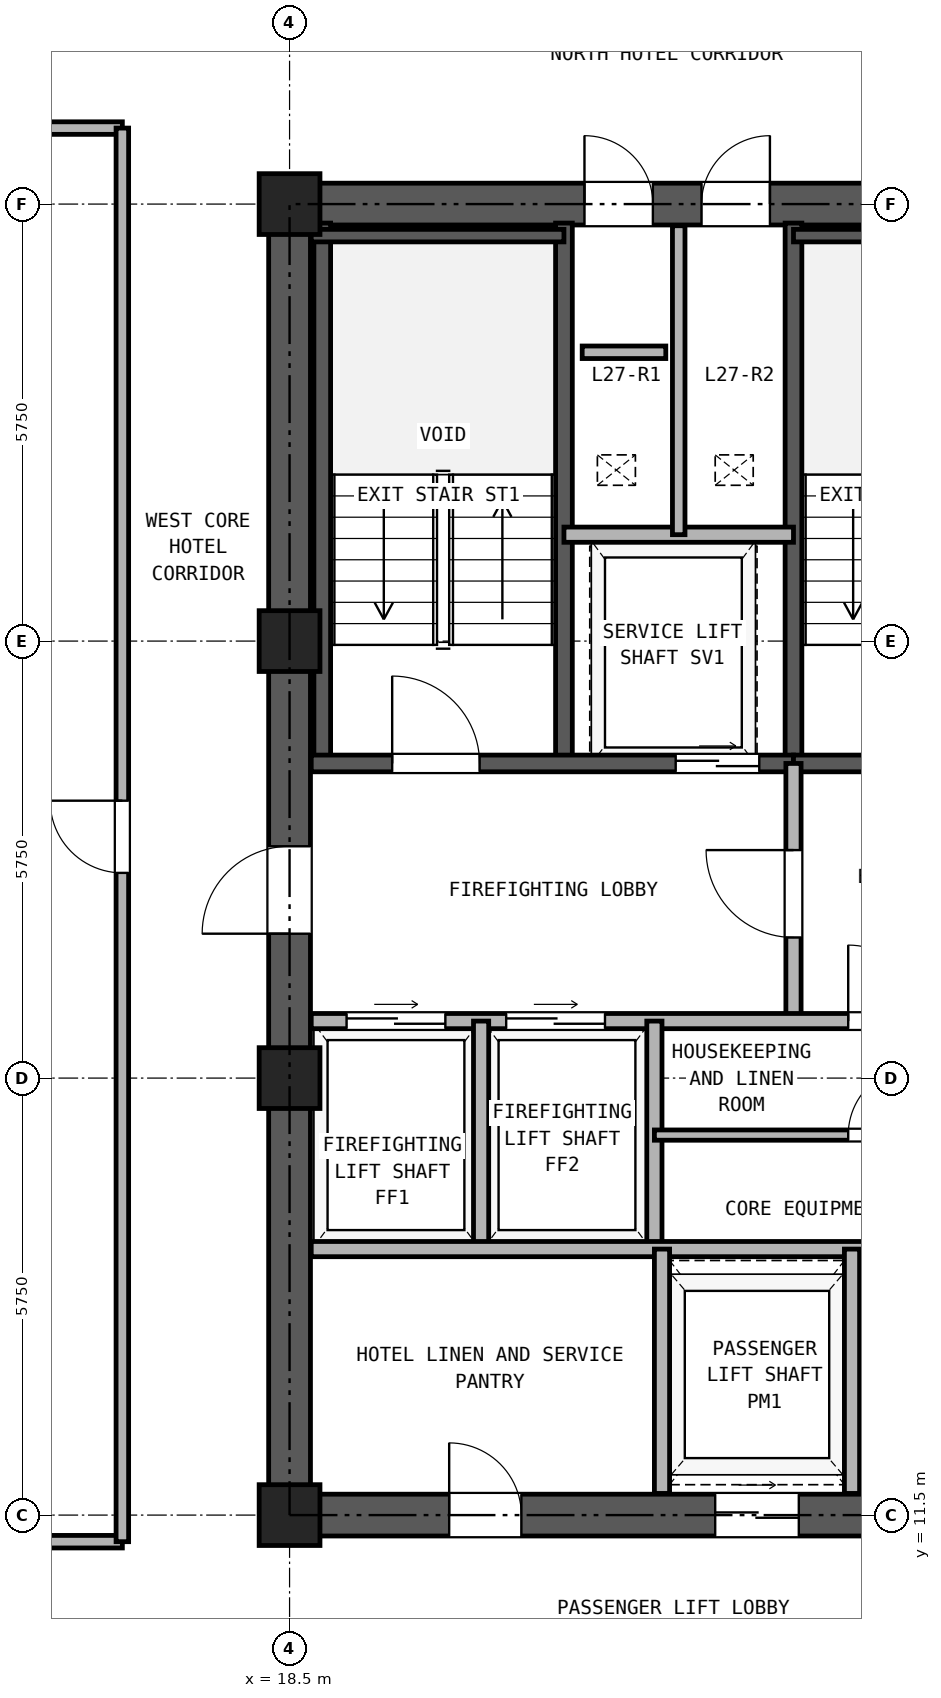
"""IFC4 building model, lengths in metres.
Left out: names, types, materials, properties, quantities, classifications, styles, units other than length and angle.
Written with IfcOpenShell. Run it as: python <this file> out.ifc"""

import sys

from ifc_helpers import new_model, si_unit, direction, frame, frame_2d, origin, origin_2d, place, context, subcontext, project, spatial, rectangle, hollow_rectangle, extrude, source, transform, mapped, element, fill, save


model = new_model("IFC4")
c1 = context("Model", 3, precision=1e-05, world=origin(), true_north=direction((0.0, 1.0)))
c2 = subcontext(c1, "Body", "Model", "MODEL_VIEW")
j1 = project(units=[si_unit("LENGTHUNIT", "METRE"), si_unit("PLANEANGLEUNIT", "RADIAN")], contexts=[c1])
p1 = place(None, origin())
s1 = spatial("IfcSite", under=j1, at=p1, CompositionType="ELEMENT")
p2 = place(p1, origin())
s2 = spatial("IfcBuilding", under=s1, at=p2, CompositionType="ELEMENT")
p3 = place(p2, frame((0.0, 0.0, 102.3)))
s3 = spatial("IfcBuildingStorey", under=s2, at=p3, CompositionType="ELEMENT", Elevation=102.3)
m1 = source(origin(), c2, "Body", "SweptSolid", [
    extrude(hollow_rectangle(XDim=0.8, YDim=0.8, WallThickness=0.045, at=origin_2d()), origin(), (0.0, 0.0, 1.0), 2.95),
])
for number, where, z_axis, x_axis in (
    (1, (18.5, 11.5, 0.0), (0.0, 0.0, 1.0), (1.0, 0.0, 0.0)),
    (2, (18.5, 17.25, 0.0), (0.0, 0.0, 1.0), (1.0, 0.0, 0.0)),
    (3, (18.5, 23.0, 0.0), (0.0, 0.0, 1.0), (1.0, 0.0, 0.0)),
    (4, (18.5, 28.75, 0.0), (0.0, 0.0, 1.0), (1.0, 0.0, 0.0)),
):
    element("IfcColumn", number, at=place(p3, frame(where, z_axis=z_axis, x_axis=x_axis)), inside=s3, PredefinedType="COLUMN", context=c2, shape_type="MappedRepresentation", body=[
        mapped(m1, transform((0.0, 0.0, 0.0), x_axis=(1.0, 0.0, 0.0), y_axis=(0.0, 1.0, 0.0), z_axis=(0.0, 0.0, 1.0), scale=1.0)),
    ])
p4 = place(p3, frame((18.225, 11.5, 0.0), z_axis=(0.0, 0.0, 1.0), x_axis=(1.0, 0.0, 0.0)))
e5 = element("IfcWall", 5, at=p4, inside=s3, PredefinedType="SHEAR", context=c2, shape_type="SweptSolid", body=[
    extrude(rectangle(XDim=10.55, YDim=0.55, at=frame_2d((5.275, 0.0))), origin(), (0.0, 0.0, 1.0), 2.95),
])
p5 = place(p4, frame((2.375, 0.0, 0.0)))
e6 = element("IfcOpeningElement", 6, at=p5, cuts=e5, PredefinedType="OPENING", context=c2, shape_type="SweptSolid", body=[
    extrude(rectangle(XDim=0.95, YDim=2.15, at=frame_2d((0.475, 1.075))), frame((0.0, 0.285, 0.0), z_axis=(0.0, -1.0, 0.0), x_axis=(1.0, 0.0, 0.0)), (0.0, 0.0, 1.0), 0.57),
])
p6 = place(p4, frame((5.875, 0.0, 0.0)))
e7 = element("IfcOpeningElement", 7, at=p6, cuts=e5, PredefinedType="OPENING", context=c2, shape_type="SweptSolid", body=[
    extrude(rectangle(XDim=1.1, YDim=2.25, at=frame_2d((0.55, 1.125))), frame((0.0, 0.285, 0.0), z_axis=(0.0, -1.0, 0.0), x_axis=(1.0, 0.0, 0.0)), (0.0, 0.0, 1.0), 0.57),
])
p7 = place(p4, frame((8.275, 0.0, 0.0)))
e8 = element("IfcOpeningElement", 8, at=p7, cuts=e5, PredefinedType="OPENING", context=c2, shape_type="SweptSolid", body=[
    extrude(rectangle(XDim=1.1, YDim=2.25, at=frame_2d((0.55, 1.125))), frame((0.0, 0.285, 0.0), z_axis=(0.0, -1.0, 0.0), x_axis=(1.0, 0.0, 0.0)), (0.0, 0.0, 1.0), 0.57),
])
p8 = place(p3, frame((18.225, 28.75, 0.0), z_axis=(0.0, 0.0, 1.0), x_axis=(1.0, 0.0, 0.0)))
e9 = element("IfcWall", 9, at=p8, inside=s3, PredefinedType="SHEAR", context=c2, shape_type="SweptSolid", body=[
    extrude(rectangle(XDim=10.55, YDim=0.55, at=frame_2d((5.275, 0.0))), origin(), (0.0, 0.0, 1.0), 2.95),
])
p9 = place(p8, frame((4.155, 0.0, 0.0)))
e10 = element("IfcOpeningElement", 10, at=p9, cuts=e9, PredefinedType="OPENING", context=c2, shape_type="SweptSolid", body=[
    extrude(rectangle(XDim=0.9, YDim=2.05, at=frame_2d((0.45, 1.025))), frame((0.0, 0.285, 0.0), z_axis=(0.0, -1.0, 0.0), x_axis=(1.0, 0.0, 0.0)), (0.0, 0.0, 1.0), 0.57),
])
p10 = place(p8, frame((5.695, 0.0, 0.0)))
e11 = element("IfcOpeningElement", 11, at=p10, cuts=e9, PredefinedType="OPENING", context=c2, shape_type="SweptSolid", body=[
    extrude(rectangle(XDim=0.9, YDim=2.05, at=frame_2d((0.45, 1.025))), frame((0.0, 0.285, 0.0), z_axis=(0.0, -1.0, 0.0), x_axis=(1.0, 0.0, 0.0)), (0.0, 0.0, 1.0), 0.57),
])
p11 = place(p3, frame((18.5, 11.775, 0.0), z_axis=(0.0, 0.0, 1.0), x_axis=(0.0, 1.0, 0.0)))
e12 = element("IfcWall", 12, at=p11, inside=s3, PredefinedType="SHEAR", context=c2, shape_type="SweptSolid", body=[
    extrude(rectangle(XDim=16.7, YDim=0.55, at=frame_2d((8.35, 0.0))), origin(), (0.0, 0.0, 1.0), 2.95),
])
p12 = place(p11, frame((7.375, 0.0, 0.0)))
e13 = element("IfcOpeningElement", 13, at=p12, cuts=e12, PredefinedType="OPENING", context=c2, shape_type="SweptSolid", body=[
    extrude(rectangle(XDim=1.15, YDim=2.2, at=frame_2d((0.575, 1.1))), frame((0.0, 0.285, 0.0), z_axis=(0.0, -1.0, 0.0), x_axis=(1.0, 0.0, 0.0)), (0.0, 0.0, 1.0), 0.57),
])
for number, where, z_axis, x_axis in (
    (14, (18.93, 21.39, 0.0), (0.0, 0.0, 1.0), (0.0, 1.0, 0.0)),
    (15, (22.11, 21.39, 0.0), (0.0, 0.0, 1.0), (0.0, 1.0, 0.0)),
    (16, (25.13, 21.39, 0.0), (0.0, 0.0, 1.0), (0.0, 1.0, 0.0)),
):
    element("IfcWall", number, at=place(p3, frame(where, z_axis=z_axis, x_axis=x_axis)), inside=s3, PredefinedType="SOLIDWALL", context=c2, shape_type="SweptSolid", body=[
        extrude(rectangle(XDim=7.11, YDim=0.22, at=frame_2d((3.555, 0.0))), origin(), (0.0, 0.0, 1.0), 2.95),
    ])
p13 = place(p3, frame((18.785, 28.335, 0.0), z_axis=(0.0, 0.0, 1.0), x_axis=(1.0, 0.0, 0.0)))
e17 = element("IfcWall", 17, at=p13, inside=s3, PredefinedType="PARTITIONING", context=c2, shape_type="SweptSolid", body=[
    extrude(rectangle(XDim=3.325, YDim=0.165, at=frame_2d((1.663, 0.0))), origin(), (0.0, 0.0, 1.0), 2.95),
])
p14 = place(p3, frame((25.13, 28.335, 0.0), z_axis=(0.0, 0.0, 1.0), x_axis=(1.0, 0.0, 0.0)))
e18 = element("IfcWall", 18, at=p14, inside=s3, PredefinedType="PARTITIONING", context=c2, shape_type="SweptSolid", body=[
    extrude(rectangle(XDim=3.085, YDim=0.165, at=frame_2d((1.542, 0.0))), origin(), (0.0, 0.0, 1.0), 2.95),
])
p15 = place(p3, frame((18.785, 21.39, 0.0), z_axis=(0.0, 0.0, 1.0), x_axis=(1.0, 0.0, 0.0)))
e19 = element("IfcWall", 19, at=p15, inside=s3, PredefinedType="SOLIDWALL", context=c2, shape_type="SweptSolid", body=[
    extrude(rectangle(XDim=6.345, YDim=0.22, at=frame_2d((3.172, 0.0))), origin(), (0.0, 0.0, 1.0), 2.95),
])
p16 = place(p15, frame((1.065, 0.0, 0.0)))
e20 = element("IfcOpeningElement", 20, at=p16, cuts=e19, PredefinedType="OPENING", context=c2, shape_type="SweptSolid", body=[
    extrude(rectangle(XDim=1.15, YDim=2.2, at=frame_2d((0.575, 1.1))), frame((0.0, 0.12, 0.0), z_axis=(0.0, -1.0, 0.0), x_axis=(1.0, 0.0, 0.0)), (0.0, 0.0, 1.0), 0.24),
])
p17 = place(p15, frame((4.795, 0.0, 0.0)))
e21 = element("IfcOpeningElement", 21, at=p17, cuts=e19, PredefinedType="OPENING", context=c2, shape_type="SweptSolid", body=[
    extrude(rectangle(XDim=1.1, YDim=2.25, at=frame_2d((0.55, 1.125))), frame((0.0, 0.12, 0.0), z_axis=(0.0, -1.0, 0.0), x_axis=(1.0, 0.0, 0.0)), (0.0, 0.0, 1.0), 0.24),
])
p18 = place(p3, frame((25.13, 21.39, 0.0), z_axis=(0.0, 0.0, 1.0), x_axis=(1.0, 0.0, 0.0)))
e22 = element("IfcWall", 22, at=p18, inside=s3, PredefinedType="SOLIDWALL", context=c2, shape_type="SweptSolid", body=[
    extrude(rectangle(XDim=3.085, YDim=0.22, at=frame_2d((1.542, 0.0))), origin(), (0.0, 0.0, 1.0), 2.95),
])
p19 = place(p18, frame((0.92, 0.0, 0.0)))
e23 = element("IfcOpeningElement", 23, at=p19, cuts=e22, PredefinedType="OPENING", context=c2, shape_type="SweptSolid", body=[
    extrude(rectangle(XDim=1.15, YDim=2.2, at=frame_2d((0.575, 1.1))), frame((0.0, 0.12, 0.0), z_axis=(0.0, -1.0, 0.0), x_axis=(1.0, 0.0, 0.0)), (0.0, 0.0, 1.0), 0.24),
])
p20 = place(p3, frame((22.11, 24.4, 0.0), z_axis=(0.0, 0.0, 1.0), x_axis=(1.0, 0.0, 0.0)))
e24 = element("IfcWall", 24, at=p20, inside=s3, PredefinedType="PARTITIONING", context=c2, shape_type="SweptSolid", body=[
    extrude(rectangle(XDim=3.02, YDim=0.2, at=frame_2d((1.51, 0.0))), origin(), (0.0, 0.0, 1.0), 2.95),
])
p21 = place(p3, frame((23.62, 24.4, 0.0), z_axis=(0.0, 0.0, 1.0), x_axis=(0.0, 1.0, 0.0)))
e25 = element("IfcWall", 25, at=p21, inside=s3, PredefinedType="PARTITIONING", context=c2, shape_type="SweptSolid", body=[
    extrude(rectangle(XDim=4.065, YDim=0.165, at=frame_2d((2.033, 0.0))), origin(), (0.0, 0.0, 1.0), 2.95),
])
p22 = place(p3, frame((25.13, 18.0, 0.0), z_axis=(0.0, 0.0, 1.0), x_axis=(0.0, 1.0, 0.0)))
e26 = element("IfcWall", 26, at=p22, inside=s3, PredefinedType="PARTITIONING", context=c2, shape_type="SweptSolid", body=[
    extrude(rectangle(XDim=3.39, YDim=0.2, at=frame_2d((1.695, 0.0))), origin(), (0.0, 0.0, 1.0), 2.95),
])
p23 = place(p22, frame((1.1, 0.0, 0.0)))
e27 = element("IfcOpeningElement", 27, at=p23, cuts=e26, PredefinedType="OPENING", context=c2, shape_type="SweptSolid", body=[
    extrude(rectangle(XDim=1.15, YDim=2.2, at=frame_2d((0.575, 1.1))), frame((0.0, 0.11, 0.0), z_axis=(0.0, -1.0, 0.0), x_axis=(1.0, 0.0, 0.0)), (0.0, 0.0, 1.0), 0.22),
])
p24 = place(p3, frame((18.785, 18.0, 0.0), z_axis=(0.0, 0.0, 1.0), x_axis=(1.0, 0.0, 0.0)))
e28 = element("IfcWall", 28, at=p24, inside=s3, PredefinedType="PARTITIONING", context=c2, shape_type="SweptSolid", body=[
    extrude(rectangle(XDim=9.43, YDim=0.2, at=frame_2d((4.715, 0.0))), origin(), (0.0, 0.0, 1.0), 2.95),
])
p25 = place(p24, frame((0.465, 0.0, 0.0)))
e29 = element("IfcOpeningElement", 29, at=p25, cuts=e28, PredefinedType="OPENING", context=c2, shape_type="SweptSolid", body=[
    extrude(rectangle(XDim=1.3, YDim=2.3, at=frame_2d((0.65, 1.15))), frame((0.0, 0.11, 0.0), z_axis=(0.0, -1.0, 0.0), x_axis=(1.0, 0.0, 0.0)), (0.0, 0.0, 1.0), 0.22),
])
p26 = place(p24, frame((2.565, 0.0, 0.0)))
e30 = element("IfcOpeningElement", 30, at=p26, cuts=e28, PredefinedType="OPENING", context=c2, shape_type="SweptSolid", body=[
    extrude(rectangle(XDim=1.3, YDim=2.3, at=frame_2d((0.65, 1.15))), frame((0.0, 0.11, 0.0), z_axis=(0.0, -1.0, 0.0), x_axis=(1.0, 0.0, 0.0)), (0.0, 0.0, 1.0), 0.22),
])
p27 = place(p24, frame((7.065, 0.0, 0.0)))
e31 = element("IfcOpeningElement", 31, at=p27, cuts=e28, PredefinedType="OPENING", context=c2, shape_type="SweptSolid", body=[
    extrude(rectangle(XDim=1.0, YDim=2.15, at=frame_2d((0.5, 1.075))), frame((0.0, 0.11, 0.0), z_axis=(0.0, -1.0, 0.0), x_axis=(1.0, 0.0, 0.0)), (0.0, 0.0, 1.0), 0.22),
])
for number, where, z_axis, x_axis in (
    (32, (21.02, 15.0, 0.0), (0.0, 0.0, 1.0), (0.0, 1.0, 0.0)),
    (33, (23.3, 15.0, 0.0), (0.0, 0.0, 1.0), (0.0, 1.0, 0.0)),
):
    element("IfcWall", number, at=place(p3, frame(where, z_axis=z_axis, x_axis=x_axis)), inside=s3, PredefinedType="PARTITIONING", context=c2, shape_type="SweptSolid", body=[
        extrude(rectangle(XDim=3.0, YDim=0.2, at=frame_2d((1.5, 0.0))), origin(), (0.0, 0.0, 1.0), 2.95),
    ])
p28 = place(p3, frame((18.785, 15.0, 0.0), z_axis=(0.0, 0.0, 1.0), x_axis=(1.0, 0.0, 0.0)))
e34 = element("IfcWall", 34, at=p28, inside=s3, PredefinedType="PARTITIONING", context=c2, shape_type="SweptSolid", body=[
    extrude(rectangle(XDim=9.43, YDim=0.2, at=frame_2d((4.715, 0.0))), origin(), (0.0, 0.0, 1.0), 2.95),
])
p29 = place(p3, frame((23.3, 16.5, 0.0), z_axis=(0.0, 0.0, 1.0), x_axis=(1.0, 0.0, 0.0)))
e35 = element("IfcWall", 35, at=p29, inside=s3, PredefinedType="PARTITIONING", context=c2, shape_type="SweptSolid", body=[
    extrude(rectangle(XDim=4.915, YDim=0.135, at=frame_2d((2.458, 0.0))), origin(), (0.0, 0.0, 1.0), 2.95),
])
p30 = place(p29, frame((2.55, 0.0, 0.0)))
e36 = element("IfcOpeningElement", 36, at=p30, cuts=e35, PredefinedType="OPENING", context=c2, shape_type="SweptSolid", body=[
    extrude(rectangle(XDim=0.9, YDim=2.05, at=frame_2d((0.45, 1.025))), frame((0.0, 0.077, 0.0), z_axis=(0.0, -1.0, 0.0), x_axis=(1.0, 0.0, 0.0)), (0.0, 0.0, 1.0), 0.155),
])
for number, where, z_axis, x_axis in (
    (37, (23.4, 11.785, 0.0), (0.0, 0.0, 1.0), (0.0, 1.0, 0.0)),
    (38, (25.9, 11.785, 0.0), (0.0, 0.0, 1.0), (0.0, 1.0, 0.0)),
):
    element("IfcWall", number, at=place(p3, frame(where, z_axis=z_axis, x_axis=x_axis)), inside=s3, PredefinedType="PARTITIONING", context=c2, shape_type="SweptSolid", body=[
        extrude(rectangle(XDim=3.215, YDim=0.2, at=frame_2d((1.607, 0.0))), origin(), (0.0, 0.0, 1.0), 2.95),
    ])
for number, where, z_axis, x_axis in (
    (39, (9.2, 11.15, 0.0), (0.0, 0.0, 1.0), (1.0, 0.0, 0.0)),
    (40, (9.2, 29.75, 0.0), (0.0, 0.0, 1.0), (1.0, 0.0, 0.0)),
):
    element("IfcWall", number, at=place(p3, frame(where, z_axis=z_axis, x_axis=x_axis)), inside=s3, PredefinedType="PARTITIONING", context=c2, shape_type="SweptSolid", body=[
        extrude(rectangle(XDim=7.1, YDim=0.165, at=frame_2d((3.55, 0.0))), origin(), (0.0, 0.0, 1.0), 2.95),
    ])
p31 = place(p3, frame((16.3, 11.15, 0.0), z_axis=(0.0, 0.0, 1.0), x_axis=(0.0, 1.0, 0.0)))
e41 = element("IfcWall", 41, at=p31, inside=s3, PredefinedType="PARTITIONING", context=c2, shape_type="SweptSolid", body=[
    extrude(rectangle(XDim=18.6, YDim=0.165, at=frame_2d((9.3, 0.0))), origin(), (0.0, 0.0, 1.0), 2.95),
])
p32 = place(p31, frame((8.8, 0.0, 0.0)))
e42 = element("IfcOpeningElement", 42, at=p32, cuts=e41, PredefinedType="OPENING", context=c2, shape_type="SweptSolid", body=[
    extrude(rectangle(XDim=0.95, YDim=2.15, at=frame_2d((0.475, 1.075))), frame((0.0, 0.093, 0.0), z_axis=(0.0, -1.0, 0.0), x_axis=(1.0, 0.0, 0.0)), (0.0, 0.0, 1.0), 0.185),
])
p33 = place(p3, frame((22.35, 26.8, 0.0), z_axis=(0.0, 0.0, 1.0), x_axis=(1.0, 0.0, 0.0)))
e43 = element("IfcWall", 43, at=p33, inside=s3, PredefinedType="PARTITIONING", context=c2, shape_type="SweptSolid", body=[
    extrude(rectangle(XDim=1.1, YDim=0.165, at=frame_2d((0.55, 0.0))), origin(), (0.0, 0.0, 1.0), 2.95),
])
p34 = place(p16, frame((1.15, 0.0, 0.0), z_axis=(0.0, 0.0, 1.0), x_axis=(-1.0, 0.0, 0.0)))
e44 = element("IfcDoor", 44, at=p34, inside=s3, OperationType="SINGLE_SWING_LEFT", PredefinedType="DOOR", context=c2, shape_type="SweptSolid", body=[
    extrude(rectangle(XDim=1.15, YDim=2.2, at=frame_2d((0.575, 1.1))), frame((0.0, 0.025, 0.0), z_axis=(0.0, -1.0, 0.0), x_axis=(1.0, 0.0, 0.0)), (0.0, 0.0, 1.0), 0.05),
])
fill(e20, e44)
p35 = place(p17, frame((1.1, 0.0, 0.0), z_axis=(0.0, 0.0, 1.0), x_axis=(-1.0, 0.0, 0.0)))
e45 = element("IfcDoor", 45, at=p35, inside=s3, OperationType="DOUBLE_DOOR_SLIDING", PredefinedType="DOOR", context=c2, shape_type="SweptSolid", body=[
    extrude(rectangle(XDim=1.1, YDim=2.25, at=frame_2d((0.55, 1.125))), frame((0.0, 0.025, 0.0), z_axis=(0.0, -1.0, 0.0), x_axis=(1.0, 0.0, 0.0)), (0.0, 0.0, 1.0), 0.05),
])
fill(e21, e45)
p36 = place(p23, origin())
e46 = element("IfcDoor", 46, at=p36, inside=s3, OperationType="SINGLE_SWING_RIGHT", PredefinedType="DOOR", context=c2, shape_type="SweptSolid", body=[
    extrude(rectangle(XDim=1.15, YDim=2.2, at=frame_2d((0.575, 1.1))), frame((0.0, 0.025, 0.0), z_axis=(0.0, -1.0, 0.0), x_axis=(1.0, 0.0, 0.0)), (0.0, 0.0, 1.0), 0.05),
])
fill(e27, e46)
p37 = place(p25, origin())
e47 = element("IfcDoor", 47, at=p37, inside=s3, OperationType="DOUBLE_DOOR_SLIDING", PredefinedType="DOOR", context=c2, shape_type="SweptSolid", body=[
    extrude(rectangle(XDim=1.3, YDim=2.3, at=frame_2d((0.65, 1.15))), frame((0.0, 0.025, 0.0), z_axis=(0.0, -1.0, 0.0), x_axis=(1.0, 0.0, 0.0)), (0.0, 0.0, 1.0), 0.05),
])
fill(e29, e47)
p38 = place(p26, origin())
e48 = element("IfcDoor", 48, at=p38, inside=s3, OperationType="DOUBLE_DOOR_SLIDING", PredefinedType="DOOR", context=c2, shape_type="SweptSolid", body=[
    extrude(rectangle(XDim=1.3, YDim=2.3, at=frame_2d((0.65, 1.15))), frame((0.0, 0.025, 0.0), z_axis=(0.0, -1.0, 0.0), x_axis=(1.0, 0.0, 0.0)), (0.0, 0.0, 1.0), 0.05),
])
fill(e30, e48)
p39 = place(p27, frame((1.0, 0.0, 0.0), z_axis=(0.0, 0.0, 1.0), x_axis=(-1.0, 0.0, 0.0)))
e49 = element("IfcDoor", 49, at=p39, inside=s3, OperationType="SINGLE_SWING_LEFT", PredefinedType="DOOR", context=c2, shape_type="SweptSolid", body=[
    extrude(rectangle(XDim=1.0, YDim=2.15, at=frame_2d((0.5, 1.075))), frame((0.0, 0.025, 0.0), z_axis=(0.0, -1.0, 0.0), x_axis=(1.0, 0.0, 0.0)), (0.0, 0.0, 1.0), 0.05),
])
fill(e31, e49)
p40 = place(p30, frame((0.9, 0.0, 0.0), z_axis=(0.0, 0.0, 1.0), x_axis=(-1.0, 0.0, 0.0)))
e50 = element("IfcDoor", 50, at=p40, inside=s3, OperationType="SINGLE_SWING_RIGHT", PredefinedType="DOOR", context=c2, shape_type="SweptSolid", body=[
    extrude(rectangle(XDim=0.9, YDim=2.05, at=frame_2d((0.45, 1.025))), frame((0.0, 0.025, 0.0), z_axis=(0.0, -1.0, 0.0), x_axis=(1.0, 0.0, 0.0)), (0.0, 0.0, 1.0), 0.05),
])
fill(e36, e50)
p41 = place(p12, frame((1.15, 0.0, 0.0), z_axis=(0.0, 0.0, 1.0), x_axis=(-1.0, 0.0, 0.0)))
e51 = element("IfcDoor", 51, at=p41, inside=s3, OperationType="SINGLE_SWING_LEFT", PredefinedType="DOOR", context=c2, shape_type="SweptSolid", body=[
    extrude(rectangle(XDim=1.15, YDim=2.2, at=frame_2d((0.575, 1.1))), frame((0.0, 0.025, 0.0), z_axis=(0.0, -1.0, 0.0), x_axis=(1.0, 0.0, 0.0)), (0.0, 0.0, 1.0), 0.05),
])
fill(e13, e51)
p42 = place(p9, origin())
e52 = element("IfcDoor", 52, at=p42, inside=s3, OperationType="SINGLE_SWING_LEFT", PredefinedType="DOOR", context=c2, shape_type="SweptSolid", body=[
    extrude(rectangle(XDim=0.9, YDim=2.05, at=frame_2d((0.45, 1.025))), frame((0.0, 0.025, 0.0), z_axis=(0.0, -1.0, 0.0), x_axis=(1.0, 0.0, 0.0)), (0.0, 0.0, 1.0), 0.05),
])
fill(e10, e52)
p43 = place(p10, origin())
e53 = element("IfcDoor", 53, at=p43, inside=s3, OperationType="SINGLE_SWING_RIGHT", PredefinedType="DOOR", context=c2, shape_type="SweptSolid", body=[
    extrude(rectangle(XDim=0.9, YDim=2.05, at=frame_2d((0.45, 1.025))), frame((0.0, 0.025, 0.0), z_axis=(0.0, -1.0, 0.0), x_axis=(1.0, 0.0, 0.0)), (0.0, 0.0, 1.0), 0.05),
])
fill(e11, e53)
p44 = place(p5, frame((0.95, 0.0, 0.0), z_axis=(0.0, 0.0, 1.0), x_axis=(-1.0, 0.0, 0.0)))
e54 = element("IfcDoor", 54, at=p44, inside=s3, OperationType="SINGLE_SWING_LEFT", PredefinedType="DOOR", context=c2, shape_type="SweptSolid", body=[
    extrude(rectangle(XDim=0.95, YDim=2.15, at=frame_2d((0.475, 1.075))), frame((0.0, 0.025, 0.0), z_axis=(0.0, -1.0, 0.0), x_axis=(1.0, 0.0, 0.0)), (0.0, 0.0, 1.0), 0.05),
])
fill(e6, e54)
p45 = place(p6, frame((1.1, 0.0, 0.0), z_axis=(0.0, 0.0, 1.0), x_axis=(-1.0, 0.0, 0.0)))
e55 = element("IfcDoor", 55, at=p45, inside=s3, OperationType="DOUBLE_DOOR_SLIDING", PredefinedType="DOOR", context=c2, shape_type="SweptSolid", body=[
    extrude(rectangle(XDim=1.1, YDim=2.25, at=frame_2d((0.55, 1.125))), frame((0.0, 0.025, 0.0), z_axis=(0.0, -1.0, 0.0), x_axis=(1.0, 0.0, 0.0)), (0.0, 0.0, 1.0), 0.05),
])
fill(e7, e55)
p46 = place(p32, frame((0.95, 0.0, 0.0), z_axis=(0.0, 0.0, 1.0), x_axis=(-1.0, 0.0, 0.0)))
e56 = element("IfcDoor", 56, at=p46, inside=s3, OperationType="SINGLE_SWING_RIGHT", PredefinedType="DOOR", context=c2, shape_type="SweptSolid", body=[
    extrude(rectangle(XDim=0.95, YDim=2.15, at=frame_2d((0.475, 1.075))), frame((0.0, 0.025, 0.0), z_axis=(0.0, -1.0, 0.0), x_axis=(1.0, 0.0, 0.0)), (0.0, 0.0, 1.0), 0.05),
])
fill(e42, e56)
save(model, sys.argv[1])
